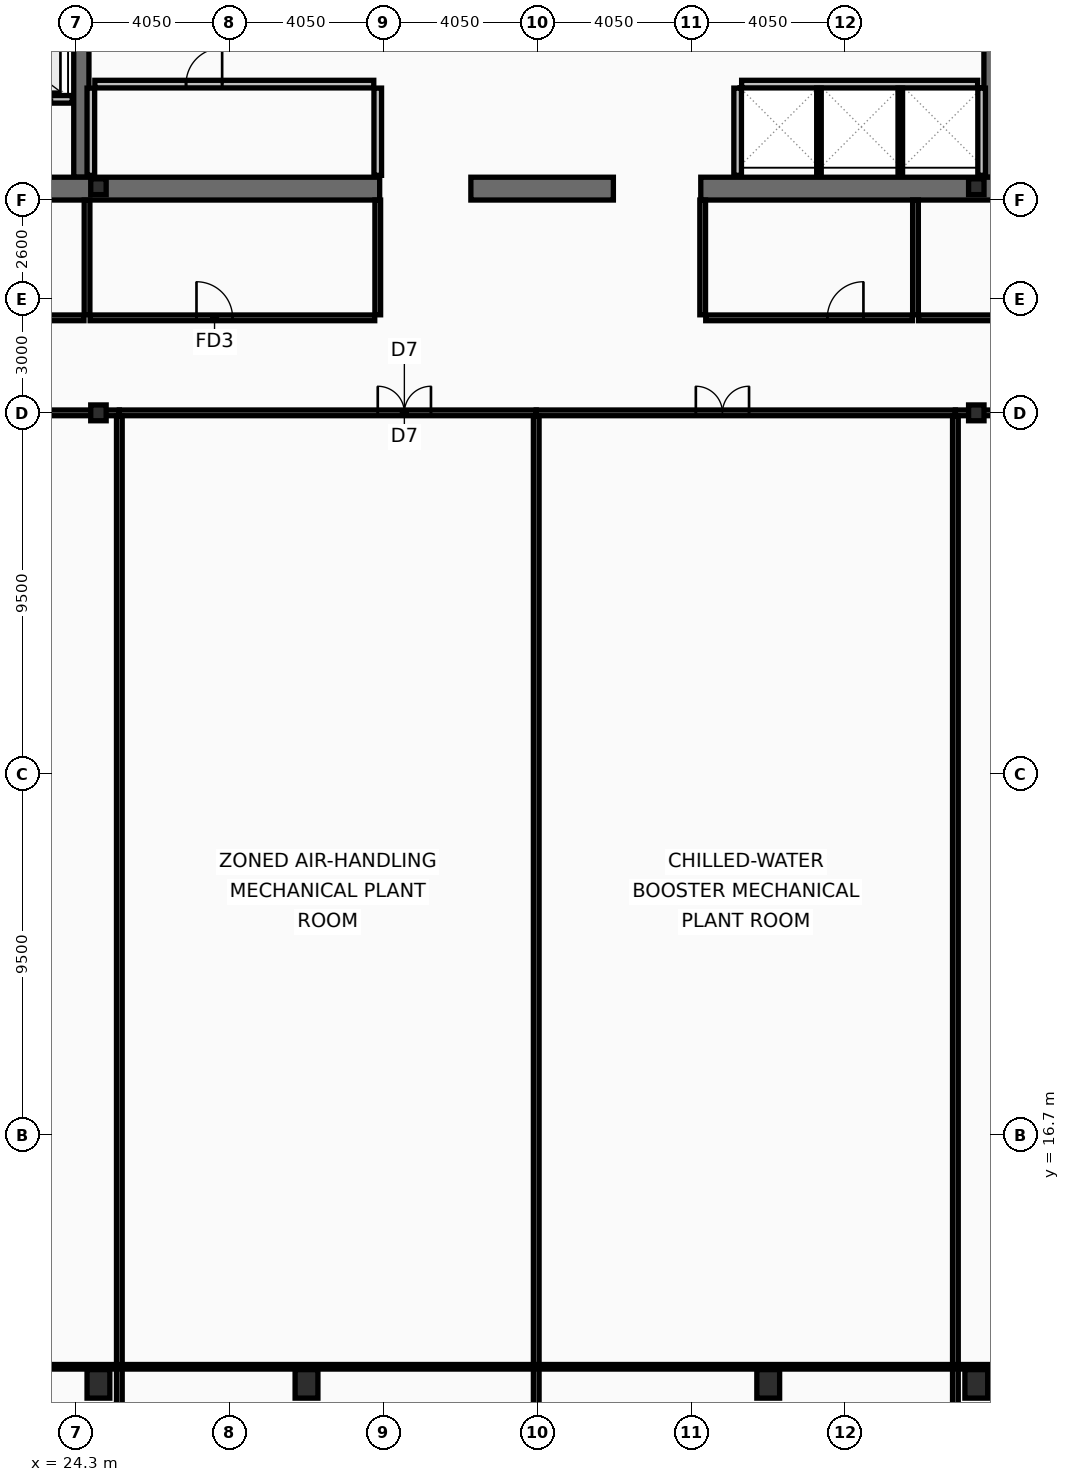
"""IFC4 building model, lengths in metres.
Left out: names, types, materials, properties, quantities, classifications, styles, units other than length and angle.
Written with IfcOpenShell. Run it as: python <this file> out.ifc"""

import sys

from ifc_helpers import new_model, si_unit, direction, frame, frame_2d, origin, origin_2d, place, context, subcontext, project, spatial, rectangle, hollow_rectangle, i_section, extrude, element, fill, save


model = new_model("IFC4")
c1 = context("Model", 3, precision=1e-05, world=origin(), true_north=direction((0.0, 1.0)))
c2 = subcontext(c1, "Body", "Model", "MODEL_VIEW")
j1 = project(units=[si_unit("LENGTHUNIT", "METRE"), si_unit("PLANEANGLEUNIT", "RADIAN")], contexts=[c1])
p1 = place(None, origin())
s1 = spatial("IfcSite", under=j1, at=p1, CompositionType="ELEMENT")
p2 = place(p1, origin())
s2 = spatial("IfcBuilding", under=s1, at=p2, CompositionType="ELEMENT")
p3 = place(p2, frame((0.0, 0.0, 257.0)))
s3 = spatial("IfcBuildingStorey", under=s2, at=p3, CompositionType="ELEMENT", Elevation=257.0)
for number, where, z_axis, x_axis in (
    (1, (24.45, 41.9, 0.0), (0.0, 0.0, 1.0), (0.0, 1.0, 0.0)),
    (2, (48.4, 41.9, 0.0), (0.0, 0.0, 1.0), (0.0, 1.0, 0.0)),
):
    element("IfcWall", number, at=place(p3, frame(where, z_axis=z_axis, x_axis=x_axis)), inside=s3, PredefinedType="SHEAR", context=c2, shape_type="SweptSolid", body=[
        extrude(rectangle(XDim=11.2, YDim=0.4, at=frame_2d((5.6, 0.0))), origin(), (0.0, 0.0, 1.0), 4.64),
    ])
p4 = place(p3, frame((32.3, 41.6, 0.0), z_axis=(0.0, 0.0, 1.0), x_axis=(-1.0, 0.0, 0.0)))
e3 = element("IfcWall", 3, at=p4, inside=s3, PredefinedType="SHEAR", context=c2, shape_type="SweptSolid", body=[
    extrude(rectangle(XDim=11.45, YDim=0.6, at=frame_2d((5.725, 0.0))), origin(), (0.0, 0.0, 1.0), 4.64),
])
p5 = place(p3, frame((38.45, 41.6, 0.0), z_axis=(0.0, 0.0, 1.0), x_axis=(-1.0, 0.0, 0.0)))
e4 = element("IfcWall", 4, at=p5, inside=s3, PredefinedType="SHEAR", context=c2, shape_type="SweptSolid", body=[
    extrude(rectangle(XDim=3.75, YDim=0.6, at=frame_2d((1.875, 0.0))), origin(), (0.0, 0.0, 1.0), 4.64),
])
p6 = place(p3, frame((52.05, 41.6, 0.0), z_axis=(0.0, 0.0, 1.0), x_axis=(-1.0, 0.0, 0.0)))
e5 = element("IfcWall", 5, at=p6, inside=s3, PredefinedType="SHEAR", context=c2, shape_type="SweptSolid", body=[
    extrude(rectangle(XDim=11.3, YDim=0.6, at=frame_2d((5.65, 0.0))), origin(), (0.0, 0.0, 1.0), 4.64),
])
for number, where, z_axis, x_axis in (
    (6, (24.9, 10.15, 0.0), (0.0, 0.0, 1.0), (1.0, 0.0, 0.0)),
    (7, (30.375, 10.15, 0.0), (0.0, 0.0, 1.0), (1.0, 0.0, 0.0)),
    (8, (42.525, 10.15, 0.0), (0.0, 0.0, 1.0), (1.0, 0.0, 0.0)),
    (9, (48.0, 10.15, 0.0), (0.0, 0.0, 1.0), (1.0, 0.0, 0.0)),
):
    element("IfcColumn", number, at=place(p3, frame(where, z_axis=z_axis, x_axis=x_axis)), inside=s3, PredefinedType="COLUMN", context=c2, shape_type="SweptSolid", body=[
        extrude(hollow_rectangle(XDim=0.6, YDim=0.75, WallThickness=0.045, at=origin_2d()), origin(), (0.0, 0.0, 1.0), 4.8),
    ])
for number, where, z_axis, x_axis in (
    (10, (24.9, 35.7, 0.0), (0.0, 0.0, 1.0), (1.0, 0.0, 0.0)),
    (11, (24.9, 41.65, 0.0), (0.0, 0.0, 1.0), (1.0, 0.0, 0.0)),
    (12, (48.0, 35.7, 0.0), (0.0, 0.0, 1.0), (1.0, 0.0, 0.0)),
    (13, (48.0, 41.65, 0.0), (0.0, 0.0, 1.0), (1.0, 0.0, 0.0)),
):
    element("IfcColumn", number, at=place(p3, frame(where, z_axis=z_axis, x_axis=x_axis)), inside=s3, PredefinedType="COLUMN", context=c2, shape_type="SweptSolid", body=[
        extrude(i_section(OverallWidth=0.406, OverallDepth=0.416, WebThickness=0.03, FlangeThickness=0.048, at=origin_2d()), origin(), (0.0, 0.0, 1.0), 4.8),
    ])
p7 = place(p3, frame((24.21, 43.95, 0.0), z_axis=(0.0, 0.0, 1.0), x_axis=(-1.0, 0.0, 0.0)))
e14 = element("IfcWall", 14, at=p7, inside=s3, PredefinedType="PARTITIONING", context=c2, shape_type="SweptSolid", body=[
    extrude(rectangle(XDim=2.97, YDim=0.2, at=frame_2d((1.485, 0.0))), origin(), (0.0, 0.0, 1.0), 4.64),
])
p8 = place(p7, frame((0.86, 0.0, 0.0)))
e15 = element("IfcOpeningElement", 15, at=p8, cuts=e14, PredefinedType="OPENING", context=c2, shape_type="SweptSolid", body=[
    extrude(rectangle(XDim=1.3, YDim=2.18, at=frame_2d((0.65, 1.09))), frame((0.0, 0.11, 0.0), z_axis=(0.0, -1.0, 0.0), x_axis=(1.0, 0.0, 0.0)), (0.0, 0.0, 1.0), 0.22),
])
for number, where, z_axis, x_axis in (
    (16, (24.7, 41.95, 0.0), (0.0, 0.0, 1.0), (0.0, 1.0, 0.0)),
    (17, (32.25, 41.95, 0.0), (0.0, 0.0, 1.0), (0.0, 1.0, 0.0)),
):
    element("IfcWall", number, at=place(p3, frame(where, z_axis=z_axis, x_axis=x_axis)), inside=s3, PredefinedType="PARTITIONING", context=c2, shape_type="SweptSolid", body=[
        extrude(rectangle(XDim=2.295, YDim=0.2, at=frame_2d((1.147, 0.0))), origin(), (0.0, 0.0, 1.0), 4.64),
    ])
p9 = place(p3, frame((24.805, 44.35, 0.0), z_axis=(0.0, 0.0, 1.0), x_axis=(1.0, 0.0, 0.0)))
e18 = element("IfcWall", 18, at=p9, inside=s3, PredefinedType="PARTITIONING", context=c2, shape_type="SweptSolid", body=[
    extrude(rectangle(XDim=7.34, YDim=0.2, at=frame_2d((3.67, 0.0))), origin(), (0.0, 0.0, 1.0), 4.64),
])
p10 = place(p9, frame((2.4, 0.0, 0.0)))
e19 = element("IfcOpeningElement", 19, at=p10, cuts=e18, PredefinedType="OPENING", context=c2, shape_type="SweptSolid", body=[
    extrude(rectangle(XDim=0.95, YDim=2.1, at=frame_2d((0.475, 1.05))), frame((0.0, 0.11, 0.0), z_axis=(0.0, -1.0, 0.0), x_axis=(1.0, 0.0, 0.0)), (0.0, 0.0, 1.0), 0.22),
])
p11 = place(p3, frame((41.825, 44.35, 0.0), z_axis=(0.0, 0.0, 1.0), x_axis=(1.0, 0.0, 0.0)))
e20 = element("IfcWall", 20, at=p11, inside=s3, PredefinedType="PARTITIONING", context=c2, shape_type="SweptSolid", body=[
    extrude(rectangle(XDim=6.21, YDim=0.2, at=frame_2d((3.105, 0.0))), origin(), (0.0, 0.0, 1.0), 4.64),
])
for number, where, z_axis, x_axis in (
    (21, (41.72, 41.95, 0.0), (0.0, 0.0, 1.0), (0.0, 1.0, 0.0)),
    (22, (48.14, 41.95, 0.0), (0.0, 0.0, 1.0), (0.0, 1.0, 0.0)),
):
    element("IfcWall", number, at=place(p3, frame(where, z_axis=z_axis, x_axis=x_axis)), inside=s3, PredefinedType="PARTITIONING", context=c2, shape_type="SweptSolid", body=[
        extrude(rectangle(XDim=2.295, YDim=0.2, at=frame_2d((1.147, 0.0))), origin(), (0.0, 0.0, 1.0), 4.64),
    ])
for number, where, z_axis, x_axis in (
    (23, (43.86, 41.95, 0.0), (0.0, 0.0, 1.0), (0.0, 1.0, 0.0)),
    (24, (46.0, 41.95, 0.0), (0.0, 0.0, 1.0), (0.0, 1.0, 0.0)),
):
    element("IfcWall", number, at=place(p3, frame(where, z_axis=z_axis, x_axis=x_axis)), inside=s3, PredefinedType="PARTITIONING", context=c2, shape_type="SweptSolid", body=[
        extrude(rectangle(XDim=2.295, YDim=0.12, at=frame_2d((1.147, 0.0))), origin(), (0.0, 0.0, 1.0), 4.64),
    ])
p12 = place(p3, frame((21.05, 35.7, 0.0), z_axis=(0.0, 0.0, 1.0), x_axis=(1.0, 0.0, 0.0)))
e25 = element("IfcWall", 25, at=p12, inside=s3, PredefinedType="PARTITIONING", context=c2, shape_type="SweptSolid", body=[
    extrude(rectangle(XDim=4.4, YDim=0.15, at=frame_2d((2.2, 0.0))), origin(), (0.0, 0.0, 1.0), 3.98),
])
p13 = place(p3, frame((25.45, 35.7, 0.0), z_axis=(0.0, 0.0, 1.0), x_axis=(1.0, 0.0, 0.0)))
e26 = element("IfcWall", 26, at=p13, inside=s3, PredefinedType="PARTITIONING", context=c2, shape_type="SweptSolid", body=[
    extrude(rectangle(XDim=10.97, YDim=0.15, at=frame_2d((5.485, 0.0))), origin(), (0.0, 0.0, 1.0), 3.98),
])
p14 = place(p13, frame((6.8, 0.0, 0.0)))
e27 = element("IfcOpeningElement", 27, at=p14, cuts=e26, PredefinedType="OPENING", context=c2, shape_type="SweptSolid", body=[
    extrude(rectangle(XDim=1.4, YDim=2.15, at=frame_2d((0.7, 1.075))), frame((0.0, 0.085, 0.0), z_axis=(0.0, -1.0, 0.0), x_axis=(1.0, 0.0, 0.0)), (0.0, 0.0, 1.0), 0.17),
])
p15 = place(p3, frame((36.42, 35.7, 0.0), z_axis=(0.0, 0.0, 1.0), x_axis=(1.0, 0.0, 0.0)))
e28 = element("IfcWall", 28, at=p15, inside=s3, PredefinedType="PARTITIONING", context=c2, shape_type="SweptSolid", body=[
    extrude(rectangle(XDim=11.03, YDim=0.15, at=frame_2d((5.515, 0.0))), origin(), (0.0, 0.0, 1.0), 3.98),
])
p16 = place(p15, frame((4.2, 0.0, 0.0)))
e29 = element("IfcOpeningElement", 29, at=p16, cuts=e28, PredefinedType="OPENING", context=c2, shape_type="SweptSolid", body=[
    extrude(rectangle(XDim=1.4, YDim=2.15, at=frame_2d((0.7, 1.075))), frame((0.0, 0.085, 0.0), z_axis=(0.0, -1.0, 0.0), x_axis=(1.0, 0.0, 0.0)), (0.0, 0.0, 1.0), 0.17),
])
p17 = place(p3, frame((47.45, 35.7, 0.0), z_axis=(0.0, 0.0, 1.0), x_axis=(1.0, 0.0, 0.0)))
e30 = element("IfcWall", 30, at=p17, inside=s3, PredefinedType="PARTITIONING", context=c2, shape_type="SweptSolid", body=[
    extrude(rectangle(XDim=4.4, YDim=0.15, at=frame_2d((2.2, 0.0))), origin(), (0.0, 0.0, 1.0), 3.98),
])
p18 = place(p3, frame((36.42, 9.32, 0.0), z_axis=(0.0, 0.0, 1.0), x_axis=(0.0, 1.0, 0.0)))
e31 = element("IfcWall", 31, at=p18, inside=s3, PredefinedType="PARTITIONING", context=c2, shape_type="SweptSolid", body=[
    extrude(rectangle(XDim=26.3, YDim=0.15, at=frame_2d((13.15, 0.0))), origin(), (0.0, 0.0, 1.0), 4.03),
])
for number, where, z_axis, x_axis in (
    (32, (25.45, 9.32, 0.0), (0.0, 0.0, 1.0), (0.0, 1.0, 0.0)),
    (33, (47.45, 9.32, 0.0), (0.0, 0.0, 1.0), (0.0, 1.0, 0.0)),
):
    element("IfcWall", number, at=place(p3, frame(where, z_axis=z_axis, x_axis=x_axis)), inside=s3, PredefinedType="PARTITIONING", context=c2, shape_type="SweptSolid", body=[
        extrude(rectangle(XDim=26.3, YDim=0.15, at=frame_2d((13.15, 0.0))), origin(), (0.0, 0.0, 1.0), 3.98),
    ])
p19 = place(p3, frame((20.98, 38.2, 0.0), z_axis=(0.0, 0.0, 1.0), x_axis=(1.0, 0.0, 0.0)))
e34 = element("IfcWall", 34, at=p19, inside=s3, PredefinedType="PARTITIONING", context=c2, shape_type="SweptSolid", body=[
    extrude(rectangle(XDim=3.54, YDim=0.15, at=frame_2d((1.77, 0.0))), origin(), (0.0, 0.0, 1.0), 3.98),
])
p20 = place(p19, frame((1.1, 0.0, 0.0)))
e35 = element("IfcOpeningElement", 35, at=p20, cuts=e34, PredefinedType="OPENING", context=c2, shape_type="SweptSolid", body=[
    extrude(rectangle(XDim=0.95, YDim=2.05, at=frame_2d((0.475, 1.025))), frame((0.0, 0.085, 0.0), z_axis=(0.0, -1.0, 0.0), x_axis=(1.0, 0.0, 0.0)), (0.0, 0.0, 1.0), 0.17),
])
p21 = place(p3, frame((24.68, 38.2, 0.0), z_axis=(0.0, 0.0, 1.0), x_axis=(1.0, 0.0, 0.0)))
e36 = element("IfcWall", 36, at=p21, inside=s3, PredefinedType="PARTITIONING", context=c2, shape_type="SweptSolid", body=[
    extrude(rectangle(XDim=7.49, YDim=0.15, at=frame_2d((3.745, 0.0))), origin(), (0.0, 0.0, 1.0), 3.98),
])
p22 = place(p21, frame((2.8, 0.0, 0.0)))
e37 = element("IfcOpeningElement", 37, at=p22, cuts=e36, PredefinedType="OPENING", context=c2, shape_type="SweptSolid", body=[
    extrude(rectangle(XDim=0.95, YDim=2.1, at=frame_2d((0.475, 1.05))), frame((0.0, 0.085, 0.0), z_axis=(0.0, -1.0, 0.0), x_axis=(1.0, 0.0, 0.0)), (0.0, 0.0, 1.0), 0.17),
])
p23 = place(p3, frame((24.6, 38.28, 0.0), z_axis=(0.0, 0.0, 1.0), x_axis=(0.0, 1.0, 0.0)))
e38 = element("IfcWall", 38, at=p23, inside=s3, PredefinedType="PARTITIONING", context=c2, shape_type="SweptSolid", body=[
    extrude(rectangle(XDim=3.02, YDim=0.15, at=frame_2d((1.51, 0.0))), origin(), (0.0, 0.0, 1.0), 3.98),
])
p24 = place(p3, frame((32.25, 38.28, 0.0), z_axis=(0.0, 0.0, 1.0), x_axis=(0.0, 1.0, 0.0)))
e39 = element("IfcWall", 39, at=p24, inside=s3, PredefinedType="PARTITIONING", context=c2, shape_type="SweptSolid", body=[
    extrude(rectangle(XDim=3.02, YDim=0.15, at=frame_2d((1.51, 0.0))), origin(), (0.0, 0.0, 1.0), 4.64),
])
p25 = place(p3, frame((40.88, 38.2, 0.0), z_axis=(0.0, 0.0, 1.0), x_axis=(1.0, 0.0, 0.0)))
e40 = element("IfcWall", 40, at=p25, inside=s3, PredefinedType="PARTITIONING", context=c2, shape_type="SweptSolid", body=[
    extrude(rectangle(XDim=5.44, YDim=0.15, at=frame_2d((2.72, 0.0))), origin(), (0.0, 0.0, 1.0), 3.98),
])
p26 = place(p25, frame((3.2, 0.0, 0.0)))
e41 = element("IfcOpeningElement", 41, at=p26, cuts=e40, PredefinedType="OPENING", context=c2, shape_type="SweptSolid", body=[
    extrude(rectangle(XDim=0.95, YDim=2.1, at=frame_2d((0.475, 1.05))), frame((0.0, 0.085, 0.0), z_axis=(0.0, -1.0, 0.0), x_axis=(1.0, 0.0, 0.0)), (0.0, 0.0, 1.0), 0.17),
])
p27 = place(p3, frame((46.48, 38.2, 0.0), z_axis=(0.0, 0.0, 1.0), x_axis=(1.0, 0.0, 0.0)))
e42 = element("IfcWall", 42, at=p27, inside=s3, PredefinedType="PARTITIONING", context=c2, shape_type="SweptSolid", body=[
    extrude(rectangle(XDim=5.44, YDim=0.15, at=frame_2d((2.72, 0.0))), origin(), (0.0, 0.0, 1.0), 3.98),
])
p28 = place(p27, frame((2.85, 0.0, 0.0)))
e43 = element("IfcOpeningElement", 43, at=p28, cuts=e42, PredefinedType="OPENING", context=c2, shape_type="SweptSolid", body=[
    extrude(rectangle(XDim=0.95, YDim=2.1, at=frame_2d((0.475, 1.05))), frame((0.0, 0.085, 0.0), z_axis=(0.0, -1.0, 0.0), x_axis=(1.0, 0.0, 0.0)), (0.0, 0.0, 1.0), 0.17),
])
for number, where, z_axis, x_axis in (
    (44, (40.8, 38.28, 0.0), (0.0, 0.0, 1.0), (0.0, 1.0, 0.0)),
    (45, (46.4, 38.28, 0.0), (0.0, 0.0, 1.0), (0.0, 1.0, 0.0)),
):
    element("IfcWall", number, at=place(p3, frame(where, z_axis=z_axis, x_axis=x_axis)), inside=s3, PredefinedType="PARTITIONING", context=c2, shape_type="SweptSolid", body=[
        extrude(rectangle(XDim=3.02, YDim=0.15, at=frame_2d((1.51, 0.0))), origin(), (0.0, 0.0, 1.0), 4.64),
    ])
p29 = place(p3, frame((10.095, 10.6, 0.0), z_axis=(0.0, 0.0, 1.0), x_axis=(1.0, 0.0, 0.0)))
e46 = element("IfcWall", 46, at=p29, inside=s3, PredefinedType="PARTITIONING", context=c2, shape_type="SweptSolid", body=[
    extrude(rectangle(XDim=52.71, YDim=0.12, at=frame_2d((26.355, 0.0))), origin(), (0.0, 0.0, 1.0), 3.98),
])
p30 = place(p10, origin())
e47 = element("IfcDoor", 47, at=p30, inside=s3, OperationType="SINGLE_SWING_RIGHT", PredefinedType="DOOR", context=c2, shape_type="SweptSolid", body=[
    extrude(rectangle(XDim=0.95, YDim=2.1, at=frame_2d((0.475, 1.05))), frame((0.0, 0.025, 0.0), z_axis=(0.0, -1.0, 0.0), x_axis=(1.0, 0.0, 0.0)), (0.0, 0.0, 1.0), 0.05),
])
fill(e19, e47)
p31 = place(p14, origin())
e48 = element("IfcDoor", 48, at=p31, inside=s3, OperationType="DOUBLE_DOOR_SINGLE_SWING", PredefinedType="DOOR", context=c2, shape_type="SweptSolid", body=[
    extrude(rectangle(XDim=1.4, YDim=2.15, at=frame_2d((0.7, 1.075))), frame((0.0, 0.025, 0.0), z_axis=(0.0, -1.0, 0.0), x_axis=(1.0, 0.0, 0.0)), (0.0, 0.0, 1.0), 0.05),
])
fill(e27, e48)
p32 = place(p16, origin())
e49 = element("IfcDoor", 49, at=p32, inside=s3, OperationType="DOUBLE_DOOR_SINGLE_SWING", PredefinedType="DOOR", context=c2, shape_type="SweptSolid", body=[
    extrude(rectangle(XDim=1.4, YDim=2.15, at=frame_2d((0.7, 1.075))), frame((0.0, 0.025, 0.0), z_axis=(0.0, -1.0, 0.0), x_axis=(1.0, 0.0, 0.0)), (0.0, 0.0, 1.0), 0.05),
])
fill(e29, e49)
p33 = place(p22, origin())
e50 = element("IfcDoor", 50, at=p33, inside=s3, OperationType="SINGLE_SWING_LEFT", PredefinedType="DOOR", context=c2, shape_type="SweptSolid", body=[
    extrude(rectangle(XDim=0.95, YDim=2.1, at=frame_2d((0.475, 1.05))), frame((0.0, 0.025, 0.0), z_axis=(0.0, -1.0, 0.0), x_axis=(1.0, 0.0, 0.0)), (0.0, 0.0, 1.0), 0.05),
])
fill(e37, e50)
p34 = place(p26, origin())
e51 = element("IfcDoor", 51, at=p34, inside=s3, OperationType="SINGLE_SWING_RIGHT", PredefinedType="DOOR", context=c2, shape_type="SweptSolid", body=[
    extrude(rectangle(XDim=0.95, YDim=2.1, at=frame_2d((0.475, 1.05))), frame((0.0, 0.025, 0.0), z_axis=(0.0, -1.0, 0.0), x_axis=(1.0, 0.0, 0.0)), (0.0, 0.0, 1.0), 0.05),
])
fill(e41, e51)
save(model, sys.argv[1])
